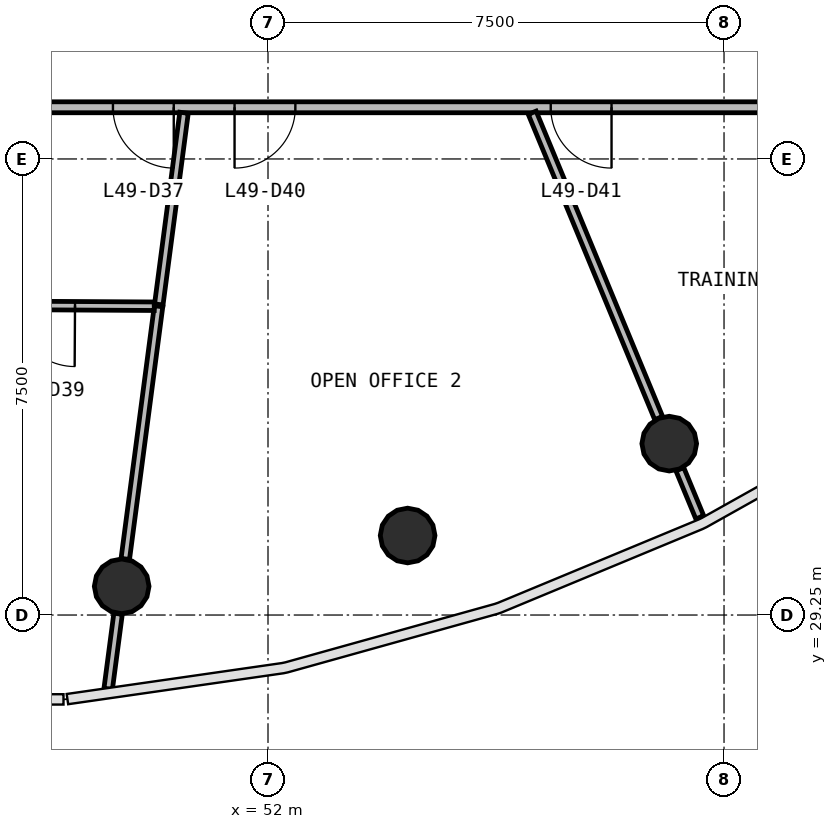
"""IFC4 building model, lengths in metres.
Left out: names, types, materials, properties, quantities, classifications, styles, units other than length and angle.
Written with IfcOpenShell. Run it as: python <this file> out.ifc"""

import sys

from ifc_helpers import new_model, si_unit, direction, frame, frame_2d, origin, origin_2d, place, context, subcontext, project, spatial, rectangle, circle, extrude, source, transform, mapped, element, fill, save


model = new_model("IFC4")
c1 = context("Model", 3, precision=1e-05, world=origin(), true_north=direction((0.0, 1.0)))
c2 = subcontext(c1, "Body", "Model", "MODEL_VIEW")
j1 = project(units=[si_unit("LENGTHUNIT", "METRE"), si_unit("PLANEANGLEUNIT", "RADIAN")], contexts=[c1])
p1 = place(None, origin())
s1 = spatial("IfcSite", under=j1, at=p1, CompositionType="ELEMENT")
p2 = place(p1, origin())
s2 = spatial("IfcBuilding", under=s1, at=p2, CompositionType="ELEMENT")
p3 = place(p2, frame((0.0, 0.0, 203.3)))
s3 = spatial("IfcBuildingStorey", under=s2, at=p3, CompositionType="ELEMENT", Elevation=203.3)
m1 = source(origin(), c2, "Body", "SweptSolid", [
    extrude(circle(Radius=0.45, at=origin_2d()), origin(), (0.0, 0.0, 1.0), 3.9),
])
for number, where, z_axis, x_axis in (
    (1, (49.594, 29.722, 0.0), (0.0, 0.0, 1.0), (1.0, 0.0, 0.0)),
    (2, (54.296, 30.558, 0.0), (0.0, 0.0, 1.0), (1.0, 0.0, 0.0)),
    (3, (58.599, 32.069, 0.0), (0.0, 0.0, 1.0), (1.0, 0.0, 0.0)),
):
    element("IfcColumn", number, at=place(p3, frame(where, z_axis=z_axis, x_axis=x_axis)), inside=s3, PredefinedType="COLUMN", context=c2, shape_type="MappedRepresentation", body=[
        mapped(m1, transform((0.0, 0.0, 0.0), scale=1.0)),
    ])
p4 = place(p3, frame((63.4, 37.6, 0.0), z_axis=(0.0, 0.0, 1.0), x_axis=(-1.0, 0.0, 0.0)))
e4 = element("IfcWall", 4, at=p4, inside=s3, PredefinedType="PARTITIONING", context=c2, shape_type="SweptSolid", body=[
    extrude(rectangle(XDim=22.8, YDim=0.18, at=frame_2d((11.4, 0.0))), origin(), (0.0, 0.0, 1.0), 2.88),
])
p5 = place(p4, frame((12.95, 0.0, 0.0)))
e5 = element("IfcOpeningElement", 5, at=p5, cuts=e4, PredefinedType="OPENING", context=c2, shape_type="SweptSolid", body=[
    extrude(rectangle(XDim=1.0, YDim=2.1, at=frame_2d((0.5, 1.05))), frame((0.0, 0.1, 0.0), z_axis=(0.0, -1.0, 0.0), x_axis=(1.0, 0.0, 0.0)), (0.0, 0.0, 1.0), 0.2),
])
p6 = place(p4, frame((10.95, 0.0, 0.0)))
e6 = element("IfcOpeningElement", 6, at=p6, cuts=e4, PredefinedType="OPENING", context=c2, shape_type="SweptSolid", body=[
    extrude(rectangle(XDim=1.0, YDim=2.1, at=frame_2d((0.5, 1.05))), frame((0.0, 0.1, 0.0), z_axis=(0.0, -1.0, 0.0), x_axis=(1.0, 0.0, 0.0)), (0.0, 0.0, 1.0), 0.2),
])
p7 = place(p4, frame((5.75, 0.0, 0.0)))
e7 = element("IfcOpeningElement", 7, at=p7, cuts=e4, PredefinedType="OPENING", context=c2, shape_type="SweptSolid", body=[
    extrude(rectangle(XDim=1.0, YDim=2.1, at=frame_2d((0.5, 1.05))), frame((0.0, 0.1, 0.0), z_axis=(0.0, -1.0, 0.0), x_axis=(1.0, 0.0, 0.0)), (0.0, 0.0, 1.0), 0.2),
])
p8 = place(p3, frame((56.345, 37.51, 0.0), z_axis=(0.0, 0.0, 1.0), x_axis=(0.382655972885, -0.923890906122, 0.0)))
e8 = element("IfcWall", 8, at=p8, inside=s3, PredefinedType="PARTITIONING", context=c2, shape_type="SweptSolid", body=[
    extrude(rectangle(XDim=5.435, YDim=0.14, at=frame_2d((2.717, 0.0))), origin(), (0.0, 0.0, 1.0), 2.88),
])
p9 = place(p3, frame((50.2, 34.328, 0.0), z_axis=(0.0, 0.0, 1.0), x_axis=(-0.130534370564, -0.99144378464, 0.0)))
e9 = element("IfcWall", 9, at=p9, inside=s3, PredefinedType="PARTITIONING", context=c2, shape_type="SweptSolid", body=[
    extrude(rectangle(XDim=4.191, YDim=0.14, at=frame_2d((2.096, 0.0))), origin(), (0.0, 0.0, 1.0), 2.88),
])
p10 = place(p3, frame((50.129, 34.328, 0.0), z_axis=(0.0, 0.0, 1.0), x_axis=(-0.999983244193, 0.005788897407, 0.0)))
e10 = element("IfcWall", 10, at=p10, inside=s3, PredefinedType="PARTITIONING", context=c2, shape_type="SweptSolid", body=[
    extrude(rectangle(XDim=3.753, YDim=0.14, at=frame_2d((1.877, 0.0))), origin(), (0.0, 0.0, 1.0), 2.88),
])
p11 = place(p10, frame((1.303, 0.0, 0.0)))
e11 = element("IfcOpeningElement", 11, at=p11, cuts=e10, PredefinedType="OPENING", context=c2, shape_type="SweptSolid", body=[
    extrude(rectangle(XDim=1.0, YDim=2.1, at=frame_2d((0.5, 1.05))), frame((0.0, 0.08, 0.0), z_axis=(0.0, -1.0, 0.0), x_axis=(1.0, 0.0, 0.0)), (0.0, 0.0, 1.0), 0.16),
])
p12 = place(p3, frame((50.619, 37.51, 0.0), z_axis=(0.0, 0.0, 1.0), x_axis=(-0.130524026108, -0.991445146546, 0.0)))
e12 = element("IfcWall", 12, at=p12, inside=s3, PredefinedType="PARTITIONING", context=c2, shape_type="SweptSolid", body=[
    extrude(rectangle(XDim=3.18, YDim=0.14, at=frame_2d((1.59, 0.0))), origin(), (0.0, 0.0, 1.0), 2.88),
])
p13 = place(p3, frame((49.534, 29.271, 0.0), z_axis=(0.0, 0.0, 1.0), x_axis=(-0.130520415919, -0.991445621821, 0.0)))
e13 = element("IfcWall", 13, at=p13, inside=s3, PredefinedType="PARTITIONING", context=c2, shape_type="SweptSolid", body=[
    extrude(rectangle(XDim=1.246, YDim=0.14, at=frame_2d((0.623, 0.0))), origin(), (0.0, 0.0, 1.0), 2.88),
])
p14 = place(p3, frame((58.773, 31.648, 0.0), z_axis=(0.0, 0.0, 1.0), x_axis=(0.382754217383, -0.92385020922, 0.0)))
e14 = element("IfcWall", 14, at=p14, inside=s3, PredefinedType="PARTITIONING", context=c2, shape_type="SweptSolid", body=[
    extrude(rectangle(XDim=0.857, YDim=0.14, at=frame_2d((0.429, 0.0))), origin(), (0.0, 0.0, 1.0), 2.88),
])
m2 = source(origin(), c2, "Body", "SweptSolid", [
    extrude(rectangle(XDim=1.0, YDim=2.1, at=frame_2d((0.5, 1.05))), frame((0.0, 0.025, 0.0), z_axis=(0.0, -1.0, 0.0), x_axis=(1.0, 0.0, 0.0)), (0.0, 0.0, 1.0), 0.05),
])
p15 = place(p5, origin())
e15 = element("IfcDoor", 15, at=p15, inside=s3, OperationType="SINGLE_SWING_LEFT", PredefinedType="DOOR", context=c2, shape_type="MappedRepresentation", body=[
    mapped(m2, transform((0.0, 0.0, 0.0), scale=1.0)),
])
fill(e5, e15)
p16 = place(p11, origin())
e16 = element("IfcDoor", 16, at=p16, inside=s3, OperationType="SINGLE_SWING_LEFT", PredefinedType="DOOR", context=c2, shape_type="MappedRepresentation", body=[
    mapped(m2, transform((0.0, 0.0, 0.0), scale=1.0)),
])
fill(e11, e16)
p17 = place(p6, origin())
e17 = element("IfcDoor", 17, at=p17, inside=s3, OperationType="SINGLE_SWING_RIGHT", PredefinedType="DOOR", context=c2, shape_type="MappedRepresentation", body=[
    mapped(m2, transform((0.0, 0.0, 0.0), scale=1.0)),
])
fill(e6, e17)
p18 = place(p7, origin())
e18 = element("IfcDoor", 18, at=p18, inside=s3, OperationType="SINGLE_SWING_LEFT", PredefinedType="DOOR", context=c2, shape_type="MappedRepresentation", body=[
    mapped(m2, transform((0.0, 0.0, 0.0), scale=1.0)),
])
fill(e7, e18)
save(model, sys.argv[1])
